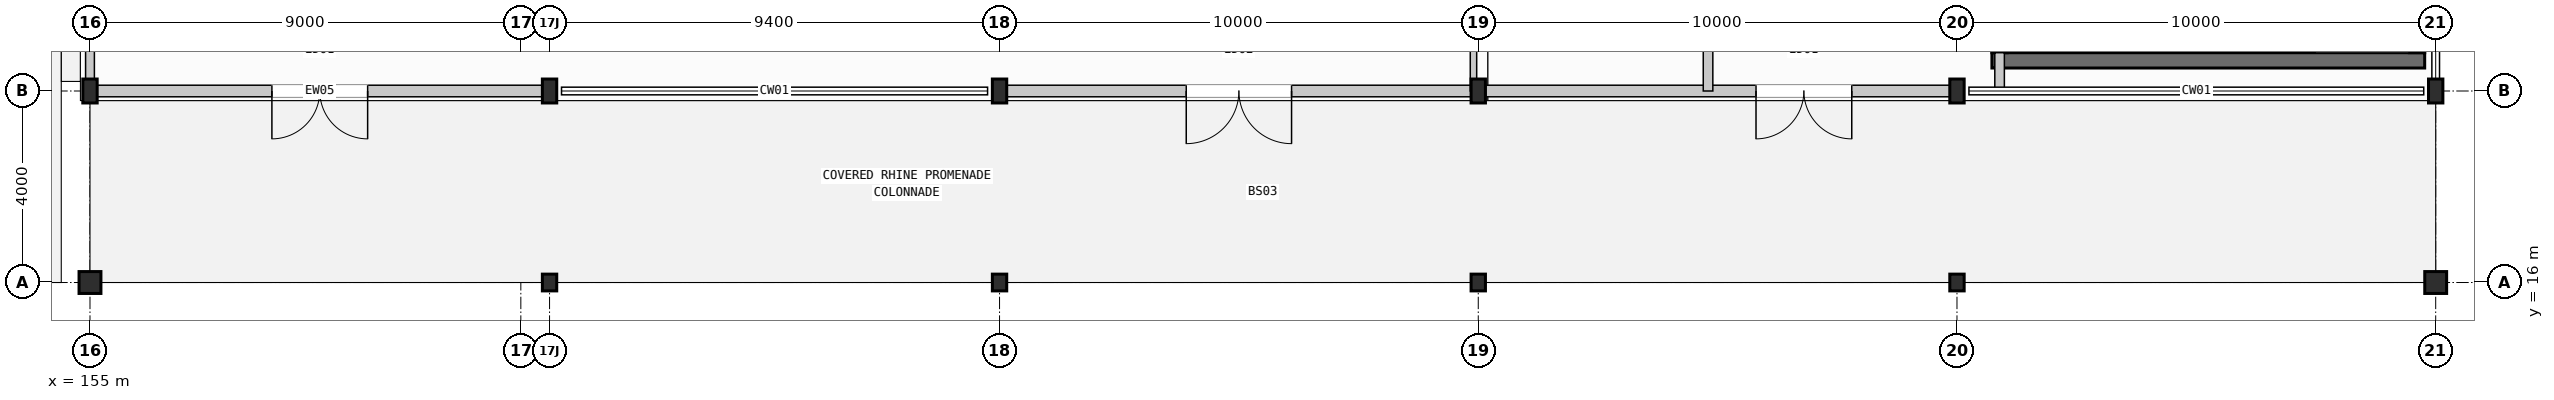
"""IFC4 building model, lengths in metres.
Left out: names, types, materials, properties, quantities, classifications, styles, units other than length and angle.
Written with IfcOpenShell. Run it as: python <this file> out.ifc"""

import sys

from ifc_helpers import new_model, si_unit, direction, frame, frame_2d, origin, origin_2d, place, context, subcontext, project, spatial, rectangle, hollow_circle, i_section, extrude, element, fill, save


model = new_model("IFC4")
c1 = context("Model", 3, precision=1e-05, world=origin(), true_north=direction((0.0, 1.0)))
c2 = subcontext(c1, "Body", "Model", "MODEL_VIEW")
j1 = project(units=[si_unit("LENGTHUNIT", "METRE"), si_unit("PLANEANGLEUNIT", "RADIAN")], contexts=[c1])
p1 = place(None, origin())
s1 = spatial("IfcSite", under=j1, at=p1, CompositionType="ELEMENT")
p2 = place(p1, origin())
s2 = spatial("IfcBuilding", under=s1, at=p2, CompositionType="ELEMENT")
p3 = place(p2, origin())
s3 = spatial("IfcBuildingStorey", under=s2, at=p3, CompositionType="ELEMENT", Elevation=0.0)
p4 = place(p3, frame((155.0, 16.0, 0.0), z_axis=(0.0, 0.0, 1.0), x_axis=(1.0, 0.0, 0.0)))
e1 = element("IfcColumn", 1, at=p4, inside=s3, PredefinedType="COLUMN", context=c2, shape_type="SweptSolid", body=[
    extrude(hollow_circle(Radius=0.229, WallThickness=0.016, at=origin_2d()), origin(), (0.0, 0.0, 1.0), 6.0),
])
p5 = place(p3, frame((155.0, 20.0, 0.0), z_axis=(0.0, 0.0, 1.0), x_axis=(1.0, 0.0, 0.0)))
e2 = element("IfcColumn", 2, at=p5, inside=s3, PredefinedType="COLUMN", context=c2, shape_type="SweptSolid", body=[
    extrude(i_section(OverallWidth=0.3, OverallDepth=0.5, WebThickness=0.014, FlangeThickness=0.028, FilletRadius=0.027, at=origin_2d()), origin(), (0.0, 0.0, 1.0), 6.0),
])
p6 = place(p3, frame((164.6, 16.0, 0.0), z_axis=(0.0, 0.0, 1.0), x_axis=(1.0, 0.0, 0.0)))
e3 = element("IfcColumn", 3, at=p6, inside=s3, PredefinedType="PILASTER", context=c2, shape_type="SweptSolid", body=[
    extrude(i_section(OverallWidth=0.3, OverallDepth=0.35, WebThickness=0.01, FlangeThickness=0.018, FilletRadius=0.027, at=origin_2d()), origin(), (0.0, 0.0, 1.0), 6.0),
])
p7 = place(p3, frame((164.6, 20.0, 0.0), z_axis=(0.0, 0.0, 1.0), x_axis=(1.0, 0.0, 0.0)))
e4 = element("IfcColumn", 4, at=p7, inside=s3, PredefinedType="COLUMN", context=c2, shape_type="SweptSolid", body=[
    extrude(i_section(OverallWidth=0.3, OverallDepth=0.5, WebThickness=0.014, FlangeThickness=0.028, FilletRadius=0.027, at=origin_2d()), origin(), (0.0, 0.0, 1.0), 6.0),
])
p8 = place(p3, frame((174.0, 16.0, 0.0), z_axis=(0.0, 0.0, 1.0), x_axis=(1.0, 0.0, 0.0)))
e5 = element("IfcColumn", 5, at=p8, inside=s3, PredefinedType="PILASTER", context=c2, shape_type="SweptSolid", body=[
    extrude(i_section(OverallWidth=0.3, OverallDepth=0.35, WebThickness=0.01, FlangeThickness=0.018, FilletRadius=0.027, at=origin_2d()), origin(), (0.0, 0.0, 1.0), 6.0),
])
p9 = place(p3, frame((174.0, 20.0, 0.0), z_axis=(0.0, 0.0, 1.0), x_axis=(1.0, 0.0, 0.0)))
e6 = element("IfcColumn", 6, at=p9, inside=s3, PredefinedType="COLUMN", context=c2, shape_type="SweptSolid", body=[
    extrude(i_section(OverallWidth=0.3, OverallDepth=0.5, WebThickness=0.014, FlangeThickness=0.028, FilletRadius=0.027, at=origin_2d()), origin(), (0.0, 0.0, 1.0), 6.0),
])
p10 = place(p3, frame((184.0, 16.0, 0.0), z_axis=(0.0, 0.0, 1.0), x_axis=(1.0, 0.0, 0.0)))
e7 = element("IfcColumn", 7, at=p10, inside=s3, PredefinedType="PILASTER", context=c2, shape_type="SweptSolid", body=[
    extrude(i_section(OverallWidth=0.3, OverallDepth=0.35, WebThickness=0.01, FlangeThickness=0.018, FilletRadius=0.027, at=origin_2d()), origin(), (0.0, 0.0, 1.0), 6.0),
])
p11 = place(p3, frame((184.0, 20.0, 0.0), z_axis=(0.0, 0.0, 1.0), x_axis=(1.0, 0.0, 0.0)))
e8 = element("IfcColumn", 8, at=p11, inside=s3, PredefinedType="COLUMN", context=c2, shape_type="SweptSolid", body=[
    extrude(i_section(OverallWidth=0.3, OverallDepth=0.5, WebThickness=0.014, FlangeThickness=0.028, FilletRadius=0.027, at=origin_2d()), origin(), (0.0, 0.0, 1.0), 6.0),
])
p12 = place(p3, frame((194.0, 16.0, 0.0), z_axis=(0.0, 0.0, 1.0), x_axis=(1.0, 0.0, 0.0)))
e9 = element("IfcColumn", 9, at=p12, inside=s3, PredefinedType="PILASTER", context=c2, shape_type="SweptSolid", body=[
    extrude(i_section(OverallWidth=0.3, OverallDepth=0.35, WebThickness=0.01, FlangeThickness=0.018, FilletRadius=0.027, at=origin_2d()), origin(), (0.0, 0.0, 1.0), 6.0),
])
p13 = place(p3, frame((194.0, 20.0, 0.0), z_axis=(0.0, 0.0, 1.0), x_axis=(1.0, 0.0, 0.0)))
e10 = element("IfcColumn", 10, at=p13, inside=s3, PredefinedType="COLUMN", context=c2, shape_type="SweptSolid", body=[
    extrude(i_section(OverallWidth=0.3, OverallDepth=0.5, WebThickness=0.014, FlangeThickness=0.028, FilletRadius=0.027, at=origin_2d()), origin(), (0.0, 0.0, 1.0), 6.0),
])
p14 = place(p3, frame((204.0, 16.0, 0.0), z_axis=(0.0, 0.0, 1.0), x_axis=(1.0, 0.0, 0.0)))
e11 = element("IfcColumn", 11, at=p14, inside=s3, PredefinedType="COLUMN", context=c2, shape_type="SweptSolid", body=[
    extrude(hollow_circle(Radius=0.229, WallThickness=0.016, at=origin_2d()), origin(), (0.0, 0.0, 1.0), 6.0),
])
p15 = place(p3, frame((204.0, 20.0, 0.0), z_axis=(0.0, 0.0, 1.0), x_axis=(1.0, 0.0, 0.0)))
e12 = element("IfcColumn", 12, at=p15, inside=s3, PredefinedType="COLUMN", context=c2, shape_type="SweptSolid", body=[
    extrude(i_section(OverallWidth=0.3, OverallDepth=0.5, WebThickness=0.014, FlangeThickness=0.028, FilletRadius=0.027, at=origin_2d()), origin(), (0.0, 0.0, 1.0), 6.0),
])
p16 = place(p3, frame((194.73, 20.64, 0.0), z_axis=(0.0, 0.0, 1.0), x_axis=(1.0, 0.0, 0.0)))
e13 = element("IfcWall", 13, at=p16, inside=s3, PredefinedType="SHEAR", context=c2, shape_type="SweptSolid", body=[
    extrude(rectangle(XDim=9.04, YDim=0.32, at=frame_2d((4.52, 0.0))), origin(), (0.0, 0.0, 1.0), 6.0),
])
p17 = place(p3, frame((194.89, 20.8, 0.0), z_axis=(0.0, 0.0, 1.0), x_axis=(0.0, 1.0, 0.0)))
e14 = element("IfcWall", 14, at=p17, inside=s3, PredefinedType="SHEAR", context=c2, shape_type="SweptSolid", body=[
    extrude(rectangle(XDim=4.05, YDim=0.32, at=frame_2d((2.025, 0.0))), origin(), (0.0, 0.0, 1.0), 6.0),
])
p18 = place(p17, frame((1.425, 0.0, 0.0)))
e15 = element("IfcOpeningElement", 15, at=p18, cuts=e14, PredefinedType="OPENING", context=c2, shape_type="SweptSolid", body=[
    extrude(rectangle(XDim=1.2, YDim=2.2, at=frame_2d((0.6, 1.1))), frame((0.0, 0.17, 0.0), z_axis=(0.0, -1.0, 0.0), x_axis=(1.0, 0.0, 0.0)), (0.0, 0.0, 1.0), 0.34),
])
p19 = place(p3, frame((203.61, 20.8, 0.0), z_axis=(0.0, 0.0, 1.0), x_axis=(0.0, 1.0, 0.0)))
e16 = element("IfcWall", 16, at=p19, inside=s3, PredefinedType="SHEAR", context=c2, shape_type="SweptSolid", body=[
    extrude(rectangle(XDim=4.05, YDim=0.32, at=frame_2d((2.025, 0.0))), origin(), (0.0, 0.0, 1.0), 6.0),
])
p20 = place(p3, frame((155.146, 20.0, 0.0), z_axis=(0.0, 0.0, 1.0), x_axis=(1.0, 0.0, 0.0)))
e17 = element("IfcWall", 17, at=p20, inside=s3, PredefinedType="STANDARD", context=c2, shape_type="SweptSolid", body=[
    extrude(rectangle(XDim=9.308, YDim=0.242, at=frame_2d((4.654, 0.0))), origin(), (0.0, 0.0, 1.0), 5.1),
])
p21 = place(p20, frame((3.654, 0.0, 0.0)))
e18 = element("IfcOpeningElement", 18, at=p21, cuts=e17, PredefinedType="OPENING", context=c2, shape_type="SweptSolid", body=[
    extrude(rectangle(XDim=2.0, YDim=2.3, at=frame_2d((1.0, 1.15))), frame((0.0, 0.131, 0.0), z_axis=(0.0, -1.0, 0.0), x_axis=(1.0, 0.0, 0.0)), (0.0, 0.0, 1.0), 0.262),
])
p22 = place(p3, frame((174.146, 20.0, 0.0), z_axis=(0.0, 0.0, 1.0), x_axis=(1.0, 0.0, 0.0)))
e19 = element("IfcWall", 19, at=p22, inside=s3, PredefinedType="STANDARD", context=c2, shape_type="SweptSolid", body=[
    extrude(rectangle(XDim=9.708, YDim=0.242, at=frame_2d((4.854, 0.0))), origin(), (0.0, 0.0, 1.0), 5.1),
])
p23 = place(p22, frame((3.754, 0.0, 0.0)))
e20 = element("IfcOpeningElement", 20, at=p23, cuts=e19, PredefinedType="OPENING", context=c2, shape_type="SweptSolid", body=[
    extrude(rectangle(XDim=2.2, YDim=2.4, at=frame_2d((1.1, 1.2))), frame((0.0, 0.131, 0.0), z_axis=(0.0, -1.0, 0.0), x_axis=(1.0, 0.0, 0.0)), (0.0, 0.0, 1.0), 0.262),
])
p24 = place(p3, frame((184.146, 20.0, 0.0), z_axis=(0.0, 0.0, 1.0), x_axis=(1.0, 0.0, 0.0)))
e21 = element("IfcWall", 21, at=p24, inside=s3, PredefinedType="STANDARD", context=c2, shape_type="SweptSolid", body=[
    extrude(rectangle(XDim=9.708, YDim=0.242, at=frame_2d((4.854, 0.0))), origin(), (0.0, 0.0, 1.0), 5.1),
])
p25 = place(p24, frame((5.656, 0.0, 0.0)))
e22 = element("IfcOpeningElement", 22, at=p25, cuts=e21, PredefinedType="OPENING", context=c2, shape_type="SweptSolid", body=[
    extrude(rectangle(XDim=2.0, YDim=2.3, at=frame_2d((1.0, 1.15))), frame((0.0, 0.131, 0.0), z_axis=(0.0, -1.0, 0.0), x_axis=(1.0, 0.0, 0.0)), (0.0, 0.0, 1.0), 0.262),
])
p26 = place(p3, frame((155.0, 20.246, 0.0), z_axis=(0.0, 0.0, 1.0), x_axis=(0.0, 1.0, 0.0)))
e23 = element("IfcWall", 23, at=p26, inside=s3, PredefinedType="STANDARD", context=c2, shape_type="SweptSolid", body=[
    extrude(rectangle(XDim=8.008, YDim=0.184, at=frame_2d((4.004, 0.0))), origin(), (0.0, 0.0, 1.0), 5.1),
])
p27 = place(p26, frame((3.329, 0.0, 0.0)))
e24 = element("IfcOpeningElement", 24, at=p27, cuts=e23, PredefinedType="OPENING", context=c2, shape_type="SweptSolid", body=[
    extrude(rectangle(XDim=1.35, YDim=2.32, at=frame_2d((0.675, 1.16))), frame((0.0, 0.102, 0.0), z_axis=(0.0, -1.0, 0.0), x_axis=(1.0, 0.0, 0.0)), (0.0, 0.0, 1.0), 0.204),
])
p28 = place(p3, frame((188.8, 20.0, 0.0), z_axis=(0.0, 0.0, 1.0), x_axis=(0.0, 1.0, 0.0)))
e25 = element("IfcWall", 25, at=p28, inside=s3, PredefinedType="PARTITIONING", context=c2, shape_type="SweptSolid", body=[
    extrude(rectangle(XDim=4.85, YDim=0.2, at=frame_2d((2.425, 0.0))), origin(), (0.0, 0.0, 1.0), 4.2),
])
p29 = place(p3, frame((194.89, 20.0, 0.0), z_axis=(0.0, 0.0, 1.0), x_axis=(0.0, 1.0, 0.0)))
e26 = element("IfcWall", 26, at=p29, inside=s3, PredefinedType="PARTITIONING", context=c2, shape_type="SweptSolid", body=[
    extrude(rectangle(XDim=0.8, YDim=0.2, at=frame_2d((0.4, 0.0))), origin(), (0.0, 0.0, 1.0), 4.2),
])
p30 = place(p3, frame((183.9, 20.0, 0.0), z_axis=(0.0, 0.0, 1.0), x_axis=(0.0, 1.0, 0.0)))
e27 = element("IfcWall", 27, at=p30, inside=s3, PredefinedType="PARTITIONING", context=c2, shape_type="SweptSolid", body=[
    extrude(rectangle(XDim=12.3, YDim=0.134, at=frame_2d((6.15, 0.0))), origin(), (0.0, 0.0, 1.0), 4.9),
])
p31 = place(p30, frame((5.38, 0.0, 0.0)))
e28 = element("IfcOpeningElement", 28, at=p31, cuts=e27, PredefinedType="OPENING", context=c2, shape_type="SweptSolid", body=[
    extrude(rectangle(XDim=1.54, YDim=2.24, at=frame_2d((0.77, 1.12))), frame((0.0, 0.077, 0.0), z_axis=(0.0, -1.0, 0.0), x_axis=(1.0, 0.0, 0.0)), (0.0, 0.0, 1.0), 0.154),
])
p32 = place(p21, frame((2.0, 0.0, 0.0), z_axis=(0.0, 0.0, 1.0), x_axis=(-1.0, 0.0, 0.0)))
e29 = element("IfcDoor", 29, at=p32, inside=s3, OperationType="DOUBLE_DOOR_SINGLE_SWING", PredefinedType="DOOR", context=c2, shape_type="SweptSolid", body=[
    extrude(rectangle(XDim=2.0, YDim=2.3, at=frame_2d((1.0, 1.15))), frame((0.0, 0.025, 0.0), z_axis=(0.0, -1.0, 0.0), x_axis=(1.0, 0.0, 0.0)), (0.0, 0.0, 1.0), 0.05),
])
fill(e18, e29)
p33 = place(p23, frame((2.2, 0.0, 0.0), z_axis=(0.0, 0.0, 1.0), x_axis=(-1.0, 0.0, 0.0)))
e30 = element("IfcDoor", 30, at=p33, inside=s3, OperationType="DOUBLE_DOOR_SINGLE_SWING", PredefinedType="DOOR", context=c2, shape_type="SweptSolid", body=[
    extrude(rectangle(XDim=2.2, YDim=2.4, at=frame_2d((1.1, 1.2))), frame((0.0, 0.025, 0.0), z_axis=(0.0, -1.0, 0.0), x_axis=(1.0, 0.0, 0.0)), (0.0, 0.0, 1.0), 0.05),
])
fill(e20, e30)
p34 = place(p25, frame((2.0, 0.0, 0.0), z_axis=(0.0, 0.0, 1.0), x_axis=(-1.0, 0.0, 0.0)))
e31 = element("IfcDoor", 31, at=p34, inside=s3, OperationType="DOUBLE_DOOR_SINGLE_SWING", PredefinedType="DOOR", context=c2, shape_type="SweptSolid", body=[
    extrude(rectangle(XDim=2.0, YDim=2.3, at=frame_2d((1.0, 1.15))), frame((0.0, 0.025, 0.0), z_axis=(0.0, -1.0, 0.0), x_axis=(1.0, 0.0, 0.0)), (0.0, 0.0, 1.0), 0.05),
])
fill(e22, e31)
save(model, sys.argv[1])
